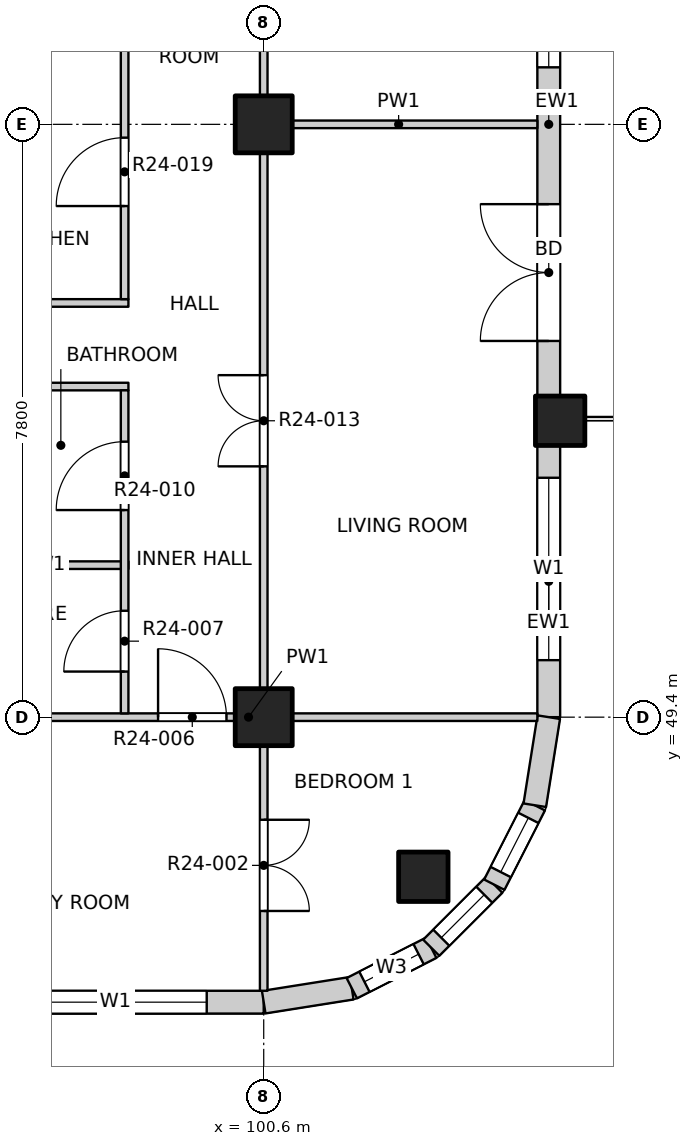
"""IFC4 building model, lengths in metres.
Left out: names, types, materials, properties, quantities, classifications, styles, units other than length and angle.
Written with IfcOpenShell. Run it as: python <this file> out.ifc"""

import sys

from ifc_helpers import new_model, si_unit, direction, frame, frame_2d, origin, origin_2d, place, context, subcontext, project, spatial, rectangle, extrude, element, fill, save


model = new_model("IFC4")
c1 = context("Model", 3, precision=1e-05, world=origin(), true_north=direction((0.0, 1.0)))
c2 = subcontext(c1, "Body", "Model", "MODEL_VIEW")
j1 = project(units=[si_unit("LENGTHUNIT", "METRE"), si_unit("PLANEANGLEUNIT", "RADIAN")], contexts=[c1])
p1 = place(None, origin())
s1 = spatial("IfcSite", under=j1, at=p1, CompositionType="ELEMENT")
p2 = place(p1, origin())
s2 = spatial("IfcBuilding", under=s1, at=p2, CompositionType="ELEMENT")
p3 = place(p2, frame((0.0, 0.0, 246.0)))
s3 = spatial("IfcBuildingStorey", under=s2, at=p3, CompositionType="ELEMENT", Elevation=246.0)
for number, where, z_axis, x_axis in (
    (1, (102.7, 47.3, -0.3), (0.0, 0.0, 1.0), (1.0, 0.0, 0.0)),
    (2, (104.5, 53.3, -0.3), (0.0, 0.0, 1.0), (1.0, 0.0, 0.0)),
):
    element("IfcColumn", number, at=place(p3, frame(where, z_axis=z_axis, x_axis=x_axis)), inside=s3, PredefinedType="COLUMN", context=c2, shape_type="SweptSolid", body=[
        extrude(rectangle(XDim=0.65, YDim=0.65, at=origin_2d()), origin(), (0.0, 0.0, 1.0), 3.45),
    ])
for number, where, z_axis, x_axis in (
    (3, (100.6, 49.4, -0.3), (0.0, 0.0, 1.0), (1.0, 0.0, 0.0)),
    (4, (100.6, 57.2, -0.3), (0.0, 0.0, 1.0), (1.0, 0.0, 0.0)),
):
    element("IfcColumn", number, at=place(p3, frame(where, z_axis=z_axis, x_axis=x_axis)), inside=s3, PredefinedType="COLUMN", context=c2, shape_type="SweptSolid", body=[
        extrude(rectangle(XDim=0.75, YDim=0.75, at=origin_2d()), origin(), (0.0, 0.0, 1.0), 3.45),
    ])
p4 = place(p3, frame((97.025, 45.65, 0.0), z_axis=(0.0, 0.0, 1.0), x_axis=(1.0, 0.0, 0.0)))
e5 = element("IfcWall", 5, at=p4, inside=s3, PredefinedType="SOLIDWALL", context=c2, shape_type="SweptSolid", body=[
    extrude(rectangle(XDim=3.575, YDim=0.3, at=frame_2d((1.788, 0.0))), origin(), (0.0, 0.0, 1.0), 2.7),
])
p5 = place(p4, frame((0.425, 0.0, 0.9)))
e6 = element("IfcOpeningElement", 6, at=p5, cuts=e5, PredefinedType="OPENING", context=c2, shape_type="SweptSolid", body=[
    extrude(rectangle(XDim=2.4, YDim=1.8, at=frame_2d((1.2, 0.9))), frame((0.0, 0.16, 0.0), z_axis=(0.0, -1.0, 0.0), x_axis=(1.0, 0.0, 0.0)), (0.0, 0.0, 1.0), 0.32),
])
p6 = place(p3, frame((104.35, 49.4, 0.0), z_axis=(0.0, 0.0, 1.0), x_axis=(0.0, 1.0, 0.0)))
e7 = element("IfcWall", 7, at=p6, inside=s3, PredefinedType="SOLIDWALL", context=c2, shape_type="SweptSolid", body=[
    extrude(rectangle(XDim=3.575, YDim=0.3, at=frame_2d((1.788, 0.0))), origin(), (0.0, 0.0, 1.0), 2.7),
])
p7 = place(p6, frame((0.75, 0.0, 0.9)))
e8 = element("IfcOpeningElement", 8, at=p7, cuts=e7, PredefinedType="OPENING", context=c2, shape_type="SweptSolid", body=[
    extrude(rectangle(XDim=2.4, YDim=1.8, at=frame_2d((1.2, 0.9))), frame((0.0, 0.16, 0.0), z_axis=(0.0, -1.0, 0.0), x_axis=(1.0, 0.0, 0.0)), (0.0, 0.0, 1.0), 0.32),
])
p8 = place(p3, frame((104.35, 53.625, 0.0), z_axis=(0.0, 0.0, 1.0), x_axis=(0.0, 1.0, 0.0)))
e9 = element("IfcWall", 9, at=p8, inside=s3, PredefinedType="SOLIDWALL", context=c2, shape_type="SweptSolid", body=[
    extrude(rectangle(XDim=7.15, YDim=0.3, at=frame_2d((3.575, 0.0))), origin(), (0.0, 0.0, 1.0), 2.7),
])
p9 = place(p8, frame((0.725, 0.0, 0.0)))
e10 = element("IfcOpeningElement", 10, at=p9, cuts=e9, PredefinedType="OPENING", context=c2, shape_type="SweptSolid", body=[
    extrude(rectangle(XDim=1.8, YDim=2.4, at=frame_2d((0.9, 1.2))), frame((0.0, 0.16, 0.0), z_axis=(0.0, -1.0, 0.0), x_axis=(1.0, 0.0, 0.0)), (0.0, 0.0, 1.0), 0.32),
])
p10 = place(p8, frame((4.325, 0.0, 0.9)))
e11 = element("IfcOpeningElement", 11, at=p10, cuts=e9, PredefinedType="OPENING", context=c2, shape_type="SweptSolid", body=[
    extrude(rectangle(XDim=2.4, YDim=1.8, at=frame_2d((1.2, 0.9))), frame((0.0, 0.16, 0.0), z_axis=(0.0, -1.0, 0.0), x_axis=(1.0, 0.0, 0.0)), (0.0, 0.0, 1.0), 0.32),
])
p11 = place(p3, frame((100.6, 45.65, 0.0), z_axis=(0.0, 0.0, 1.0), x_axis=(0.987678452879, 0.156496880861, 0.0)))
e12 = element("IfcWall", 12, at=p11, inside=s3, PredefinedType="SOLIDWALL", context=c2, shape_type="SweptSolid", body=[
    extrude(rectangle(XDim=1.173, YDim=0.3, at=frame_2d((0.586, 0.0))), origin(), (0.0, 0.0, 1.0), 2.7),
])
p12 = place(p3, frame((101.759, 45.833, 0.0), z_axis=(0.0, 0.0, 1.0), x_axis=(0.890988677504, 0.454025524128, 0.0)))
e13 = element("IfcWall", 13, at=p12, inside=s3, PredefinedType="SOLIDWALL", context=c2, shape_type="SweptSolid", body=[
    extrude(rectangle(XDim=1.173, YDim=0.3, at=frame_2d((0.587, 0.0))), origin(), (0.0, 0.0, 1.0), 2.7),
])
p13 = place(p12, frame((0.187, 0.0, 0.9)))
e14 = element("IfcOpeningElement", 14, at=p13, cuts=e13, PredefinedType="OPENING", context=c2, shape_type="SweptSolid", body=[
    extrude(rectangle(XDim=0.8, YDim=1.2, at=frame_2d((0.4, 0.6))), frame((0.0, 0.16, 0.0), z_axis=(0.0, -1.0, 0.0), x_axis=(1.0, 0.0, 0.0)), (0.0, 0.0, 1.0), 0.32),
])
p14 = place(p3, frame((102.804, 46.366, 0.0), z_axis=(0.0, 0.0, 1.0), x_axis=(0.707106781187, 0.707106781187, 0.0)))
e15 = element("IfcWall", 15, at=p14, inside=s3, PredefinedType="SOLIDWALL", context=c2, shape_type="SweptSolid", body=[
    extrude(rectangle(XDim=1.173, YDim=0.3, at=frame_2d((0.586, 0.0))), origin(), (0.0, 0.0, 1.0), 2.7),
])
p15 = place(p14, frame((0.187, 0.0, 0.9)))
e16 = element("IfcOpeningElement", 16, at=p15, cuts=e15, PredefinedType="OPENING", context=c2, shape_type="SweptSolid", body=[
    extrude(rectangle(XDim=0.8, YDim=1.2, at=frame_2d((0.4, 0.6))), frame((0.0, 0.16, 0.0), z_axis=(0.0, -1.0, 0.0), x_axis=(1.0, 0.0, 0.0)), (0.0, 0.0, 1.0), 0.32),
])
p16 = place(p3, frame((103.634, 47.196, 0.0), z_axis=(0.0, 0.0, 1.0), x_axis=(0.454025524128, 0.890988677504, 0.0)))
e17 = element("IfcWall", 17, at=p16, inside=s3, PredefinedType="SOLIDWALL", context=c2, shape_type="SweptSolid", body=[
    extrude(rectangle(XDim=1.173, YDim=0.3, at=frame_2d((0.587, 0.0))), origin(), (0.0, 0.0, 1.0), 2.7),
])
p17 = place(p16, frame((0.187, 0.0, 0.9)))
e18 = element("IfcOpeningElement", 18, at=p17, cuts=e17, PredefinedType="OPENING", context=c2, shape_type="SweptSolid", body=[
    extrude(rectangle(XDim=0.8, YDim=1.2, at=frame_2d((0.4, 0.6))), frame((0.0, 0.16, 0.0), z_axis=(0.0, -1.0, 0.0), x_axis=(1.0, 0.0, 0.0)), (0.0, 0.0, 1.0), 0.32),
])
p18 = place(p3, frame((104.167, 48.241, 0.0), z_axis=(0.0, 0.0, 1.0), x_axis=(0.156496880861, 0.987678452879, 0.0)))
e19 = element("IfcWall", 19, at=p18, inside=s3, PredefinedType="SOLIDWALL", context=c2, shape_type="SweptSolid", body=[
    extrude(rectangle(XDim=1.173, YDim=0.3, at=frame_2d((0.586, 0.0))), origin(), (0.0, 0.0, 1.0), 2.7),
])
p19 = place(p3, frame((96.6, 49.4, 0.0), z_axis=(0.0, 0.0, 1.0), x_axis=(1.0, 0.0, 0.0)))
e20 = element("IfcWall", 20, at=p19, inside=s3, PredefinedType="PARTITIONING", context=c2, shape_type="SweptSolid", body=[
    extrude(rectangle(XDim=7.6, YDim=0.1, at=frame_2d((3.8, 0.0))), origin(), (0.0, 0.0, 1.0), 3.15),
])
p20 = place(p19, frame((2.61, 0.0, 0.0)))
e21 = element("IfcOpeningElement", 21, at=p20, cuts=e20, PredefinedType="OPENING", context=c2, shape_type="SweptSolid", body=[
    extrude(rectangle(XDim=0.9, YDim=2.1, at=frame_2d((0.45, 1.05))), frame((0.0, 0.06, 0.0), z_axis=(0.0, -1.0, 0.0), x_axis=(1.0, 0.0, 0.0)), (0.0, 0.0, 1.0), 0.12),
])
for number, where, z_axis, x_axis in (
    (22, (96.6, 51.4, 0.0), (0.0, 0.0, 1.0), (1.0, 0.0, 0.0)),
    (23, (96.6, 53.75, 0.0), (0.0, 0.0, 1.0), (1.0, 0.0, 0.0)),
    (24, (96.6, 54.85, 0.0), (0.0, 0.0, 1.0), (1.0, 0.0, 0.0)),
):
    element("IfcWall", number, at=place(p3, frame(where, z_axis=z_axis, x_axis=x_axis)), inside=s3, PredefinedType="PARTITIONING", context=c2, shape_type="SweptSolid", body=[
        extrude(rectangle(XDim=2.22, YDim=0.1, at=frame_2d((1.11, 0.0))), origin(), (0.0, 0.0, 1.0), 3.15),
    ])
p21 = place(p3, frame((100.55, 57.2, 0.0), z_axis=(0.0, 0.0, 1.0), x_axis=(1.0, 0.0, 0.0)))
e25 = element("IfcWall", 25, at=p21, inside=s3, PredefinedType="PARTITIONING", context=c2, shape_type="SweptSolid", body=[
    extrude(rectangle(XDim=3.65, YDim=0.1, at=frame_2d((1.825, 0.0))), origin(), (0.0, 0.0, 1.0), 3.15),
])
p22 = place(p3, frame((98.77, 49.45, 0.0), z_axis=(0.0, 0.0, 1.0), x_axis=(0.0, 1.0, 0.0)))
e26 = element("IfcWall", 26, at=p22, inside=s3, PredefinedType="PARTITIONING", context=c2, shape_type="SweptSolid", body=[
    extrude(rectangle(XDim=4.25, YDim=0.1, at=frame_2d((2.125, 0.0))), origin(), (0.0, 0.0, 1.0), 3.15),
])
p23 = place(p22, frame((0.55, 0.0, 0.0)))
e27 = element("IfcOpeningElement", 27, at=p23, cuts=e26, PredefinedType="OPENING", context=c2, shape_type="SweptSolid", body=[
    extrude(rectangle(XDim=0.8, YDim=2.1, at=frame_2d((0.4, 1.05))), frame((0.0, 0.06, 0.0), z_axis=(0.0, -1.0, 0.0), x_axis=(1.0, 0.0, 0.0)), (0.0, 0.0, 1.0), 0.12),
])
p24 = place(p22, frame((2.675, 0.0, 0.0)))
e28 = element("IfcOpeningElement", 28, at=p24, cuts=e26, PredefinedType="OPENING", context=c2, shape_type="SweptSolid", body=[
    extrude(rectangle(XDim=0.9, YDim=2.1, at=frame_2d((0.45, 1.05))), frame((0.0, 0.06, 0.0), z_axis=(0.0, -1.0, 0.0), x_axis=(1.0, 0.0, 0.0)), (0.0, 0.0, 1.0), 0.12),
])
p25 = place(p3, frame((98.77, 54.9, 0.0), z_axis=(0.0, 0.0, 1.0), x_axis=(0.0, 1.0, 0.0)))
e29 = element("IfcWall", 29, at=p25, inside=s3, PredefinedType="PARTITIONING", context=c2, shape_type="SweptSolid", body=[
    extrude(rectangle(XDim=11.7, YDim=0.1, at=frame_2d((5.85, 0.0))), origin(), (0.0, 0.0, 1.0), 3.15),
])
p26 = place(p25, frame((1.225, 0.0, 0.0)))
e30 = element("IfcOpeningElement", 30, at=p26, cuts=e29, PredefinedType="OPENING", context=c2, shape_type="SweptSolid", body=[
    extrude(rectangle(XDim=0.9, YDim=2.1, at=frame_2d((0.45, 1.05))), frame((0.0, 0.06, 0.0), z_axis=(0.0, -1.0, 0.0), x_axis=(1.0, 0.0, 0.0)), (0.0, 0.0, 1.0), 0.12),
])
p27 = place(p25, frame((3.85, 0.0, 0.0)))
e31 = element("IfcOpeningElement", 31, at=p27, cuts=e29, PredefinedType="OPENING", context=c2, shape_type="SweptSolid", body=[
    extrude(rectangle(XDim=0.9, YDim=2.1, at=frame_2d((0.45, 1.05))), frame((0.0, 0.06, 0.0), z_axis=(0.0, -1.0, 0.0), x_axis=(1.0, 0.0, 0.0)), (0.0, 0.0, 1.0), 0.12),
])
p28 = place(p25, frame((5.95, 0.0, 0.0)))
e32 = element("IfcOpeningElement", 32, at=p28, cuts=e29, PredefinedType="OPENING", context=c2, shape_type="SweptSolid", body=[
    extrude(rectangle(XDim=0.8, YDim=2.1, at=frame_2d((0.4, 1.05))), frame((0.0, 0.06, 0.0), z_axis=(0.0, -1.0, 0.0), x_axis=(1.0, 0.0, 0.0)), (0.0, 0.0, 1.0), 0.12),
])
p29 = place(p25, frame((8.4, 0.0, 0.0)))
e33 = element("IfcOpeningElement", 33, at=p29, cuts=e29, PredefinedType="OPENING", context=c2, shape_type="SweptSolid", body=[
    extrude(rectangle(XDim=0.8, YDim=2.1, at=frame_2d((0.4, 1.05))), frame((0.0, 0.06, 0.0), z_axis=(0.0, -1.0, 0.0), x_axis=(1.0, 0.0, 0.0)), (0.0, 0.0, 1.0), 0.12),
])
p30 = place(p25, frame((10.475, 0.0, 0.0)))
e34 = element("IfcOpeningElement", 34, at=p30, cuts=e29, PredefinedType="OPENING", context=c2, shape_type="SweptSolid", body=[
    extrude(rectangle(XDim=0.9, YDim=2.1, at=frame_2d((0.45, 1.05))), frame((0.0, 0.06, 0.0), z_axis=(0.0, -1.0, 0.0), x_axis=(1.0, 0.0, 0.0)), (0.0, 0.0, 1.0), 0.12),
])
p31 = place(p3, frame((100.6, 45.8, 0.0), z_axis=(0.0, 0.0, 1.0), x_axis=(0.0, 1.0, 0.0)))
e35 = element("IfcWall", 35, at=p31, inside=s3, PredefinedType="PARTITIONING", context=c2, shape_type="SweptSolid", body=[
    extrude(rectangle(XDim=38.4, YDim=0.1, at=frame_2d((19.2, 0.0))), origin(), (0.0, 0.0, 1.0), 3.15),
])
p32 = place(p31, frame((1.05, 0.0, 0.0)))
e36 = element("IfcOpeningElement", 36, at=p32, cuts=e35, PredefinedType="OPENING", context=c2, shape_type="SweptSolid", body=[
    extrude(rectangle(XDim=1.2, YDim=2.1, at=frame_2d((0.6, 1.05))), frame((0.0, 0.06, 0.0), z_axis=(0.0, -1.0, 0.0), x_axis=(1.0, 0.0, 0.0)), (0.0, 0.0, 1.0), 0.12),
])
p33 = place(p31, frame((6.9, 0.0, 0.0)))
e37 = element("IfcOpeningElement", 37, at=p33, cuts=e35, PredefinedType="OPENING", context=c2, shape_type="SweptSolid", body=[
    extrude(rectangle(XDim=1.2, YDim=2.1, at=frame_2d((0.6, 1.05))), frame((0.0, 0.06, 0.0), z_axis=(0.0, -1.0, 0.0), x_axis=(1.0, 0.0, 0.0)), (0.0, 0.0, 1.0), 0.12),
])
p34 = place(p31, frame((12.9, 0.0, 0.0)))
e38 = element("IfcOpeningElement", 38, at=p34, cuts=e35, PredefinedType="OPENING", context=c2, shape_type="SweptSolid", body=[
    extrude(rectangle(XDim=0.9, YDim=2.1, at=frame_2d((0.45, 1.05))), frame((0.0, 0.06, 0.0), z_axis=(0.0, -1.0, 0.0), x_axis=(1.0, 0.0, 0.0)), (0.0, 0.0, 1.0), 0.12),
])
p35 = place(p31, frame((16.8, 0.0, 0.0)))
e39 = element("IfcOpeningElement", 39, at=p35, cuts=e35, PredefinedType="OPENING", context=c2, shape_type="SweptSolid", body=[
    extrude(rectangle(XDim=0.9, YDim=2.1, at=frame_2d((0.45, 1.05))), frame((0.0, 0.06, 0.0), z_axis=(0.0, -1.0, 0.0), x_axis=(1.0, 0.0, 0.0)), (0.0, 0.0, 1.0), 0.12),
])
p36 = place(p31, frame((20.7, 0.0, 0.0)))
e40 = element("IfcOpeningElement", 40, at=p36, cuts=e35, PredefinedType="OPENING", context=c2, shape_type="SweptSolid", body=[
    extrude(rectangle(XDim=0.9, YDim=2.1, at=frame_2d((0.45, 1.05))), frame((0.0, 0.06, 0.0), z_axis=(0.0, -1.0, 0.0), x_axis=(1.0, 0.0, 0.0)), (0.0, 0.0, 1.0), 0.12),
])
p37 = place(p31, frame((24.6, 0.0, 0.0)))
e41 = element("IfcOpeningElement", 41, at=p37, cuts=e35, PredefinedType="OPENING", context=c2, shape_type="SweptSolid", body=[
    extrude(rectangle(XDim=0.9, YDim=2.1, at=frame_2d((0.45, 1.05))), frame((0.0, 0.06, 0.0), z_axis=(0.0, -1.0, 0.0), x_axis=(1.0, 0.0, 0.0)), (0.0, 0.0, 1.0), 0.12),
])
p38 = place(p31, frame((30.3, 0.0, 0.0)))
e42 = element("IfcOpeningElement", 42, at=p38, cuts=e35, PredefinedType="OPENING", context=c2, shape_type="SweptSolid", body=[
    extrude(rectangle(XDim=1.2, YDim=2.1, at=frame_2d((0.6, 1.05))), frame((0.0, 0.06, 0.0), z_axis=(0.0, -1.0, 0.0), x_axis=(1.0, 0.0, 0.0)), (0.0, 0.0, 1.0), 0.12),
])
p39 = place(p31, frame((36.15, 0.0, 0.0)))
e43 = element("IfcOpeningElement", 43, at=p39, cuts=e35, PredefinedType="OPENING", context=c2, shape_type="SweptSolid", body=[
    extrude(rectangle(XDim=1.2, YDim=2.1, at=frame_2d((0.6, 1.05))), frame((0.0, 0.06, 0.0), z_axis=(0.0, -1.0, 0.0), x_axis=(1.0, 0.0, 0.0)), (0.0, 0.0, 1.0), 0.12),
])
p40 = place(p5, origin())
e44 = element("IfcWindow", 44, at=p40, inside=s3, PartitioningType="DOUBLE_PANEL_VERTICAL", PredefinedType="WINDOW", context=c2, shape_type="SweptSolid", body=[
    extrude(rectangle(XDim=2.4, YDim=1.8, at=frame_2d((1.2, 0.9))), frame((0.0, 0.03, 0.0), z_axis=(0.0, -1.0, 0.0), x_axis=(1.0, 0.0, 0.0)), (0.0, 0.0, 1.0), 0.06),
])
fill(e6, e44)
p41 = place(p7, origin())
e45 = element("IfcWindow", 45, at=p41, inside=s3, PartitioningType="DOUBLE_PANEL_VERTICAL", PredefinedType="WINDOW", context=c2, shape_type="SweptSolid", body=[
    extrude(rectangle(XDim=2.4, YDim=1.8, at=frame_2d((1.2, 0.9))), frame((0.0, 0.03, 0.0), z_axis=(0.0, -1.0, 0.0), x_axis=(1.0, 0.0, 0.0)), (0.0, 0.0, 1.0), 0.06),
])
fill(e8, e45)
p42 = place(p9, origin())
e46 = element("IfcDoor", 46, at=p42, inside=s3, OperationType="DOUBLE_DOOR_SINGLE_SWING", PredefinedType="DOOR", context=c2, shape_type="SweptSolid", body=[
    extrude(rectangle(XDim=1.8, YDim=2.4, at=frame_2d((0.9, 1.2))), frame((0.0, 0.025, 0.0), z_axis=(0.0, -1.0, 0.0), x_axis=(1.0, 0.0, 0.0)), (0.0, 0.0, 1.0), 0.05),
])
fill(e10, e46)
p43 = place(p10, origin())
e47 = element("IfcWindow", 47, at=p43, inside=s3, PartitioningType="DOUBLE_PANEL_VERTICAL", PredefinedType="WINDOW", context=c2, shape_type="SweptSolid", body=[
    extrude(rectangle(XDim=2.4, YDim=1.8, at=frame_2d((1.2, 0.9))), frame((0.0, 0.03, 0.0), z_axis=(0.0, -1.0, 0.0), x_axis=(1.0, 0.0, 0.0)), (0.0, 0.0, 1.0), 0.06),
])
fill(e11, e47)
p44 = place(p13, origin())
e48 = element("IfcWindow", 48, at=p44, inside=s3, PartitioningType="SINGLE_PANEL", PredefinedType="WINDOW", context=c2, shape_type="SweptSolid", body=[
    extrude(rectangle(XDim=0.8, YDim=1.2, at=frame_2d((0.4, 0.6))), frame((0.0, 0.03, 0.0), z_axis=(0.0, -1.0, 0.0), x_axis=(1.0, 0.0, 0.0)), (0.0, 0.0, 1.0), 0.06),
])
fill(e14, e48)
p45 = place(p15, origin())
e49 = element("IfcWindow", 49, at=p45, inside=s3, PartitioningType="SINGLE_PANEL", PredefinedType="WINDOW", context=c2, shape_type="SweptSolid", body=[
    extrude(rectangle(XDim=0.8, YDim=1.2, at=frame_2d((0.4, 0.6))), frame((0.0, 0.03, 0.0), z_axis=(0.0, -1.0, 0.0), x_axis=(1.0, 0.0, 0.0)), (0.0, 0.0, 1.0), 0.06),
])
fill(e16, e49)
p46 = place(p17, origin())
e50 = element("IfcWindow", 50, at=p46, inside=s3, PartitioningType="SINGLE_PANEL", PredefinedType="WINDOW", context=c2, shape_type="SweptSolid", body=[
    extrude(rectangle(XDim=0.8, YDim=1.2, at=frame_2d((0.4, 0.6))), frame((0.0, 0.03, 0.0), z_axis=(0.0, -1.0, 0.0), x_axis=(1.0, 0.0, 0.0)), (0.0, 0.0, 1.0), 0.06),
])
fill(e18, e50)
p47 = place(p32, origin())
e51 = element("IfcDoor", 51, at=p47, inside=s3, OperationType="DOUBLE_DOOR_SINGLE_SWING", PredefinedType="DOOR", context=c2, shape_type="SweptSolid", body=[
    extrude(rectangle(XDim=1.2, YDim=2.1, at=frame_2d((0.6, 1.05))), frame((0.0, 0.025, 0.0), z_axis=(0.0, -1.0, 0.0), x_axis=(1.0, 0.0, 0.0)), (0.0, 0.0, 1.0), 0.05),
])
fill(e36, e51)
p48 = place(p20, origin())
e52 = element("IfcDoor", 52, at=p48, inside=s3, OperationType="SINGLE_SWING_LEFT", PredefinedType="DOOR", context=c2, shape_type="SweptSolid", body=[
    extrude(rectangle(XDim=0.9, YDim=2.1, at=frame_2d((0.45, 1.05))), frame((0.0, 0.025, 0.0), z_axis=(0.0, -1.0, 0.0), x_axis=(1.0, 0.0, 0.0)), (0.0, 0.0, 1.0), 0.05),
])
fill(e21, e52)
p49 = place(p23, origin())
e53 = element("IfcDoor", 53, at=p49, inside=s3, OperationType="SINGLE_SWING_LEFT", PredefinedType="DOOR", context=c2, shape_type="SweptSolid", body=[
    extrude(rectangle(XDim=0.8, YDim=2.1, at=frame_2d((0.4, 1.05))), frame((0.0, 0.025, 0.0), z_axis=(0.0, -1.0, 0.0), x_axis=(1.0, 0.0, 0.0)), (0.0, 0.0, 1.0), 0.05),
])
fill(e27, e53)
p50 = place(p24, origin())
e54 = element("IfcDoor", 54, at=p50, inside=s3, OperationType="SINGLE_SWING_LEFT", PredefinedType="DOOR", context=c2, shape_type="SweptSolid", body=[
    extrude(rectangle(XDim=0.9, YDim=2.1, at=frame_2d((0.45, 1.05))), frame((0.0, 0.025, 0.0), z_axis=(0.0, -1.0, 0.0), x_axis=(1.0, 0.0, 0.0)), (0.0, 0.0, 1.0), 0.05),
])
fill(e28, e54)
p51 = place(p33, origin())
e55 = element("IfcDoor", 55, at=p51, inside=s3, OperationType="DOUBLE_DOOR_SINGLE_SWING", PredefinedType="DOOR", context=c2, shape_type="SweptSolid", body=[
    extrude(rectangle(XDim=1.2, YDim=2.1, at=frame_2d((0.6, 1.05))), frame((0.0, 0.025, 0.0), z_axis=(0.0, -1.0, 0.0), x_axis=(1.0, 0.0, 0.0)), (0.0, 0.0, 1.0), 0.05),
])
fill(e37, e55)
p52 = place(p26, origin())
e56 = element("IfcDoor", 56, at=p52, inside=s3, OperationType="SINGLE_SWING_LEFT", PredefinedType="DOOR", context=c2, shape_type="SweptSolid", body=[
    extrude(rectangle(XDim=0.9, YDim=2.1, at=frame_2d((0.45, 1.05))), frame((0.0, 0.025, 0.0), z_axis=(0.0, -1.0, 0.0), x_axis=(1.0, 0.0, 0.0)), (0.0, 0.0, 1.0), 0.05),
])
fill(e30, e56)
save(model, sys.argv[1])
